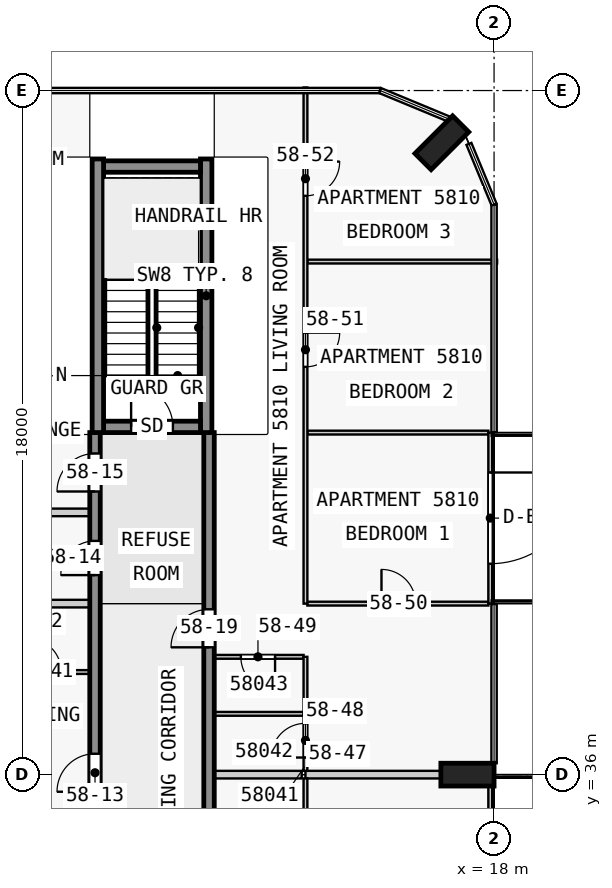
"""IFC4 building model, lengths in metres.
Left out: names, types, materials, properties, quantities, classifications, styles, units other than length and angle.
Written with IfcOpenShell. Run it as: python <this file> out.ifc"""

import sys

from ifc_helpers import new_model, si_unit, direction, frame, frame_2d, origin, origin_2d, place, context, subcontext, project, spatial, rectangle, extrude, element, fill, save


model = new_model("IFC4")
c1 = context("Model", 3, precision=1e-05, world=origin(), true_north=direction((0.0, 1.0)))
c2 = subcontext(c1, "Body", "Model", "MODEL_VIEW")
j1 = project(units=[si_unit("LENGTHUNIT", "METRE"), si_unit("PLANEANGLEUNIT", "RADIAN")], contexts=[c1])
p1 = place(None, origin())
s1 = spatial("IfcSite", under=j1, at=p1, CompositionType="ELEMENT")
p2 = place(p1, origin())
s2 = spatial("IfcBuilding", under=s1, at=p2, CompositionType="ELEMENT")
p3 = place(p2, frame((0.0, 0.0, 222.4)))
s3 = spatial("IfcBuildingStorey", under=s2, at=p3, CompositionType="ELEMENT", Elevation=222.4)
for number, where, z_axis, x_axis in (
    (1, (17.3, 36.0, 0.0), (0.0, 0.0, 1.0), (0.0, 1.0, 0.0)),
    (2, (16.626, 52.626, 0.0), (0.0, 0.0, 1.0), (-0.707, 0.707, 0.0)),
):
    element("IfcColumn", number, at=place(p3, frame(where, z_axis=z_axis, x_axis=x_axis)), inside=s3, PredefinedType="COLUMN", context=c2, shape_type="SweptSolid", body=[
        extrude(rectangle(XDim=0.6, YDim=1.4, at=origin_2d()), origin(), (0.0, 0.0, 1.0), 3.5),
    ])
p4 = place(p3, frame((7.725, 45.15, 0.0), z_axis=(0.0, 0.0, 1.0), x_axis=(1.0, 0.0, 0.0)))
e3 = element("IfcWall", 3, at=p4, inside=s3, PredefinedType="SHEAR", context=c2, shape_type="SweptSolid", body=[
    extrude(rectangle(XDim=2.55, YDim=0.3, at=frame_2d((1.275, 0.0))), origin(), (0.0, 0.0, 1.0), 3.5),
])
p5 = place(p4, frame((0.725, 0.0, 0.0)))
e4 = element("IfcOpeningElement", 4, at=p5, cuts=e3, PredefinedType="OPENING", context=c2, shape_type="SweptSolid", body=[
    extrude(rectangle(XDim=1.1, YDim=2.1, at=frame_2d((0.55, 1.05))), frame((0.0, 0.16, 0.0), z_axis=(0.0, -1.0, 0.0), x_axis=(1.0, 0.0, 0.0)), (0.0, 0.0, 1.0), 0.32),
])
p6 = place(p3, frame((7.725, 52.0, 0.0), z_axis=(0.0, 0.0, 1.0), x_axis=(1.0, 0.0, 0.0)))
e5 = element("IfcWall", 5, at=p6, inside=s3, PredefinedType="SHEAR", context=c2, shape_type="SweptSolid", body=[
    extrude(rectangle(XDim=2.55, YDim=0.3, at=frame_2d((1.275, 0.0))), origin(), (0.0, 0.0, 1.0), 3.5),
])
for number, where, z_axis, x_axis in (
    (6, (7.575, 45.0, 0.0), (0.0, 0.0, 1.0), (0.0, 1.0, 0.0)),
    (7, (10.425, 45.0, 0.0), (0.0, 0.0, 1.0), (0.0, 1.0, 0.0)),
):
    element("IfcWall", number, at=place(p3, frame(where, z_axis=z_axis, x_axis=x_axis)), inside=s3, PredefinedType="SHEAR", context=c2, shape_type="SweptSolid", body=[
        extrude(rectangle(XDim=7.2, YDim=0.3, at=frame_2d((3.6, 0.0))), origin(), (0.0, 0.0, 1.0), 3.5),
    ])
p7 = place(p3, frame((7.5, 18.0, 0.0), z_axis=(0.0, 0.0, 1.0), x_axis=(0.0, 1.0, 0.0)))
e8 = element("IfcWall", 8, at=p7, inside=s3, PredefinedType="SHEAR", context=c2, shape_type="SweptSolid", body=[
    extrude(rectangle(XDim=27.0, YDim=0.275, at=frame_2d((13.5, 0.0))), origin(), (0.0, 0.0, 1.0), 3.25),
])
p8 = place(p7, frame((1.75, 0.0, 0.0)))
e9 = element("IfcOpeningElement", 9, at=p8, cuts=e8, PredefinedType="OPENING", context=c2, shape_type="SweptSolid", body=[
    extrude(rectangle(XDim=1.0, YDim=2.1, at=frame_2d((0.5, 1.05))), frame((0.0, 0.147, 0.0), z_axis=(0.0, -1.0, 0.0), x_axis=(1.0, 0.0, 0.0)), (0.0, 0.0, 1.0), 0.295),
])
p9 = place(p7, frame((8.55, 0.0, 0.0)))
e10 = element("IfcOpeningElement", 10, at=p9, cuts=e8, PredefinedType="OPENING", context=c2, shape_type="SweptSolid", body=[
    extrude(rectangle(XDim=1.0, YDim=2.1, at=frame_2d((0.5, 1.05))), frame((0.0, 0.147, 0.0), z_axis=(0.0, -1.0, 0.0), x_axis=(1.0, 0.0, 0.0)), (0.0, 0.0, 1.0), 0.295),
])
p10 = place(p7, frame((17.55, 0.0, 0.0)))
e11 = element("IfcOpeningElement", 11, at=p10, cuts=e8, PredefinedType="OPENING", context=c2, shape_type="SweptSolid", body=[
    extrude(rectangle(XDim=1.0, YDim=2.1, at=frame_2d((0.5, 1.05))), frame((0.0, 0.147, 0.0), z_axis=(0.0, -1.0, 0.0), x_axis=(1.0, 0.0, 0.0)), (0.0, 0.0, 1.0), 0.295),
])
p11 = place(p7, frame((23.25, 0.0, 0.0)))
e12 = element("IfcOpeningElement", 12, at=p11, cuts=e8, PredefinedType="OPENING", context=c2, shape_type="SweptSolid", body=[
    extrude(rectangle(XDim=0.9, YDim=2.1, at=frame_2d((0.45, 1.05))), frame((0.0, 0.147, 0.0), z_axis=(0.0, -1.0, 0.0), x_axis=(1.0, 0.0, 0.0)), (0.0, 0.0, 1.0), 0.295),
])
p12 = place(p7, frame((25.45, 0.0, 0.0)))
e13 = element("IfcOpeningElement", 13, at=p12, cuts=e8, PredefinedType="OPENING", context=c2, shape_type="SweptSolid", body=[
    extrude(rectangle(XDim=1.0, YDim=2.1, at=frame_2d((0.5, 1.05))), frame((0.0, 0.147, 0.0), z_axis=(0.0, -1.0, 0.0), x_axis=(1.0, 0.0, 0.0)), (0.0, 0.0, 1.0), 0.295),
])
p13 = place(p3, frame((10.5, 18.0, 0.0), z_axis=(0.0, 0.0, 1.0), x_axis=(0.0, 1.0, 0.0)))
e14 = element("IfcWall", 14, at=p13, inside=s3, PredefinedType="SHEAR", context=c2, shape_type="SweptSolid", body=[
    extrude(rectangle(XDim=27.0, YDim=0.275, at=frame_2d((13.5, 0.0))), origin(), (0.0, 0.0, 1.0), 3.25),
])
p14 = place(p13, frame((4.05, 0.0, 0.0)))
e15 = element("IfcOpeningElement", 15, at=p14, cuts=e14, PredefinedType="OPENING", context=c2, shape_type="SweptSolid", body=[
    extrude(rectangle(XDim=1.0, YDim=2.1, at=frame_2d((0.5, 1.05))), frame((0.0, 0.147, 0.0), z_axis=(0.0, -1.0, 0.0), x_axis=(1.0, 0.0, 0.0)), (0.0, 0.0, 1.0), 0.295),
])
p15 = place(p13, frame((10.35, 0.0, 0.0)))
e16 = element("IfcOpeningElement", 16, at=p15, cuts=e14, PredefinedType="OPENING", context=c2, shape_type="SweptSolid", body=[
    extrude(rectangle(XDim=1.8, YDim=2.1, at=frame_2d((0.9, 1.05))), frame((0.0, 0.147, 0.0), z_axis=(0.0, -1.0, 0.0), x_axis=(1.0, 0.0, 0.0)), (0.0, 0.0, 1.0), 0.295),
])
p16 = place(p13, frame((15.25, 0.0, 0.0)))
e17 = element("IfcOpeningElement", 17, at=p16, cuts=e14, PredefinedType="OPENING", context=c2, shape_type="SweptSolid", body=[
    extrude(rectangle(XDim=1.0, YDim=2.1, at=frame_2d((0.5, 1.05))), frame((0.0, 0.147, 0.0), z_axis=(0.0, -1.0, 0.0), x_axis=(1.0, 0.0, 0.0)), (0.0, 0.0, 1.0), 0.295),
])
p17 = place(p13, frame((21.35, 0.0, 0.0)))
e18 = element("IfcOpeningElement", 18, at=p17, cuts=e14, PredefinedType="OPENING", context=c2, shape_type="SweptSolid", body=[
    extrude(rectangle(XDim=1.0, YDim=2.1, at=frame_2d((0.5, 1.05))), frame((0.0, 0.147, 0.0), z_axis=(0.0, -1.0, 0.0), x_axis=(1.0, 0.0, 0.0)), (0.0, 0.0, 1.0), 0.295),
])
p18 = place(p3, frame((17.9, 36.0, 0.0), z_axis=(0.0, 0.0, 1.0), x_axis=(0.0, -1.0, 0.0)))
e19 = element("IfcWall", 19, at=p18, inside=s3, PredefinedType="STANDARD", context=c2, shape_type="SweptSolid", body=[
    extrude(rectangle(XDim=4.5, YDim=0.1, at=frame_2d((2.25, 0.0))), origin(), (0.0, 0.0, 1.0), 3.25),
])
p19 = place(p18, frame((1.05, 0.0, 0.0)))
e20 = element("IfcOpeningElement", 20, at=p19, cuts=e19, PredefinedType="OPENING", context=c2, shape_type="SweptSolid", body=[
    extrude(rectangle(XDim=2.4, YDim=2.4, at=frame_2d((1.2, 1.2))), frame((0.0, 0.06, 0.0), z_axis=(0.0, -1.0, 0.0), x_axis=(1.0, 0.0, 0.0)), (0.0, 0.0, 1.0), 0.12),
])
p20 = place(p3, frame((17.9, 45.0, 0.0), z_axis=(0.0, 0.0, 1.0), x_axis=(0.0, -1.0, 0.0)))
e21 = element("IfcWall", 21, at=p20, inside=s3, PredefinedType="STANDARD", context=c2, shape_type="SweptSolid", body=[
    extrude(rectangle(XDim=4.5, YDim=0.1, at=frame_2d((2.25, 0.0))), origin(), (0.0, 0.0, 1.0), 3.25),
])
p21 = place(p20, frame((1.05, 0.0, 0.0)))
e22 = element("IfcOpeningElement", 22, at=p21, cuts=e21, PredefinedType="OPENING", context=c2, shape_type="SweptSolid", body=[
    extrude(rectangle(XDim=2.4, YDim=2.4, at=frame_2d((1.2, 1.2))), frame((0.0, 0.06, 0.0), z_axis=(0.0, -1.0, 0.0), x_axis=(1.0, 0.0, 0.0)), (0.0, 0.0, 1.0), 0.12),
])
p22 = place(p3, frame((12.938, 36.0, 0.0), z_axis=(0.0, 0.0, 1.0), x_axis=(-1.0, 0.0, 0.0)))
e23 = element("IfcWall", 23, at=p22, inside=s3, PredefinedType="PARTITIONING", context=c2, shape_type="SweptSolid", body=[
    extrude(rectangle(XDim=2.3, YDim=0.2, at=frame_2d((1.15, 0.0))), origin(), (0.0, 0.0, 1.0), 3.25),
])
p23 = place(p3, frame((13.038, 36.0, 0.0), z_axis=(0.0, 0.0, 1.0), x_axis=(1.0, 0.0, 0.0)))
e24 = element("IfcWall", 24, at=p23, inside=s3, PredefinedType="PARTITIONING", context=c2, shape_type="SweptSolid", body=[
    extrude(rectangle(XDim=3.562, YDim=0.2, at=frame_2d((1.781, 0.0))), origin(), (0.0, 0.0, 1.0), 3.25),
])
p24 = place(p3, frame((12.988, 37.6, 0.0), z_axis=(0.0, 0.0, 1.0), x_axis=(-1.0, 0.0, 0.0)))
e25 = element("IfcWall", 25, at=p24, inside=s3, PredefinedType="PARTITIONING", context=c2, shape_type="SweptSolid", body=[
    extrude(rectangle(XDim=2.35, YDim=0.1, at=frame_2d((1.175, 0.0))), origin(), (0.0, 0.0, 1.0), 3.25),
])
p25 = place(p3, frame((4.962, 38.7, 0.0), z_axis=(0.0, 0.0, 1.0), x_axis=(1.0, 0.0, 0.0)))
e26 = element("IfcWall", 26, at=p25, inside=s3, PredefinedType="PARTITIONING", context=c2, shape_type="SweptSolid", body=[
    extrude(rectangle(XDim=2.4, YDim=0.1, at=frame_2d((1.2, 0.0))), origin(), (0.0, 0.0, 1.0), 3.25),
])
p26 = place(p25, frame((0.75, 0.0, 0.0)))
e27 = element("IfcOpeningElement", 27, at=p26, cuts=e26, PredefinedType="OPENING", context=c2, shape_type="SweptSolid", body=[
    extrude(rectangle(XDim=0.9, YDim=2.1, at=frame_2d((0.45, 1.05))), frame((0.0, 0.06, 0.0), z_axis=(0.0, -1.0, 0.0), x_axis=(1.0, 0.0, 0.0)), (0.0, 0.0, 1.0), 0.12),
])
p27 = place(p3, frame((12.988, 39.1, 0.0), z_axis=(0.0, 0.0, 1.0), x_axis=(-1.0, 0.0, 0.0)))
e28 = element("IfcWall", 28, at=p27, inside=s3, PredefinedType="PARTITIONING", context=c2, shape_type="SweptSolid", body=[
    extrude(rectangle(XDim=2.35, YDim=0.1, at=frame_2d((1.175, 0.0))), origin(), (0.0, 0.0, 1.0), 3.25),
])
p28 = place(p27, frame((0.75, 0.0, 0.0)))
e29 = element("IfcOpeningElement", 29, at=p28, cuts=e28, PredefinedType="OPENING", context=c2, shape_type="SweptSolid", body=[
    extrude(rectangle(XDim=0.9, YDim=2.1, at=frame_2d((0.45, 1.05))), frame((0.0, 0.06, 0.0), z_axis=(0.0, -1.0, 0.0), x_axis=(1.0, 0.0, 0.0)), (0.0, 0.0, 1.0), 0.12),
])
p29 = place(p3, frame((13.087, 40.5, 0.0), z_axis=(0.0, 0.0, 1.0), x_axis=(1.0, 0.0, 0.0)))
e30 = element("IfcWall", 30, at=p29, inside=s3, PredefinedType="PARTITIONING", context=c2, shape_type="SweptSolid", body=[
    extrude(rectangle(XDim=4.763, YDim=0.1, at=frame_2d((2.381, 0.0))), origin(), (0.0, 0.0, 1.0), 3.25),
])
p30 = place(p29, frame((1.95, 0.0, 0.0)))
e31 = element("IfcOpeningElement", 31, at=p30, cuts=e30, PredefinedType="OPENING", context=c2, shape_type="SweptSolid", body=[
    extrude(rectangle(XDim=0.9, YDim=2.1, at=frame_2d((0.45, 1.05))), frame((0.0, 0.06, 0.0), z_axis=(0.0, -1.0, 0.0), x_axis=(1.0, 0.0, 0.0)), (0.0, 0.0, 1.0), 0.12),
])
p31 = place(p3, frame((7.363, 40.5, 0.0), z_axis=(0.0, 0.0, 1.0), x_axis=(-1.0, 0.0, 0.0)))
e32 = element("IfcWall", 32, at=p31, inside=s3, PredefinedType="PARTITIONING", context=c2, shape_type="SweptSolid", body=[
    extrude(rectangle(XDim=2.3, YDim=0.2, at=frame_2d((1.15, 0.0))), origin(), (0.0, 0.0, 1.0), 3.25),
])
p32 = place(p3, frame((7.363, 42.9, 0.0), z_axis=(0.0, 0.0, 1.0), x_axis=(-1.0, 0.0, 0.0)))
e33 = element("IfcWall", 33, at=p32, inside=s3, PredefinedType="PARTITIONING", context=c2, shape_type="SweptSolid", body=[
    extrude(rectangle(XDim=2.4, YDim=0.2, at=frame_2d((1.2, 0.0))), origin(), (0.0, 0.0, 1.0), 3.25),
])
p33 = place(p3, frame((17.85, 45.0, 0.0), z_axis=(0.0, 0.0, 1.0), x_axis=(-1.0, 0.0, 0.0)))
e34 = element("IfcWall", 34, at=p33, inside=s3, PredefinedType="PARTITIONING", context=c2, shape_type="SweptSolid", body=[
    extrude(rectangle(XDim=4.763, YDim=0.1, at=frame_2d((2.381, 0.0))), origin(), (0.0, 0.0, 1.0), 3.25),
])
p34 = place(p3, frame((18.08, 49.5, 0.0), z_axis=(0.0, 0.0, 1.0), x_axis=(-1.0, 0.0, 0.0)))
e35 = element("IfcWall", 35, at=p34, inside=s3, PredefinedType="PARTITIONING", context=c2, shape_type="SweptSolid", body=[
    extrude(rectangle(XDim=4.993, YDim=0.1, at=frame_2d((2.496, 0.0))), origin(), (0.0, 0.0, 1.0), 3.25),
])
p35 = place(p3, frame((13.038, 54.08, 0.0), z_axis=(0.0, 0.0, 1.0), x_axis=(0.0, -1.0, 0.0)))
e36 = element("IfcWall", 36, at=p35, inside=s3, PredefinedType="PARTITIONING", context=c2, shape_type="SweptSolid", body=[
    extrude(rectangle(XDim=13.58, YDim=0.1, at=frame_2d((6.79, 0.0))), origin(), (0.0, 0.0, 1.0), 3.25),
])
p36 = place(p35, frame((6.45, 0.0, 0.0)))
e37 = element("IfcOpeningElement", 37, at=p36, cuts=e36, PredefinedType="OPENING", context=c2, shape_type="SweptSolid", body=[
    extrude(rectangle(XDim=0.9, YDim=2.1, at=frame_2d((0.45, 1.05))), frame((0.0, 0.06, 0.0), z_axis=(0.0, -1.0, 0.0), x_axis=(1.0, 0.0, 0.0)), (0.0, 0.0, 1.0), 0.12),
])
p37 = place(p35, frame((1.95, 0.0, 0.0)))
e38 = element("IfcOpeningElement", 38, at=p37, cuts=e36, PredefinedType="OPENING", context=c2, shape_type="SweptSolid", body=[
    extrude(rectangle(XDim=0.9, YDim=2.1, at=frame_2d((0.45, 1.05))), frame((0.0, 0.06, 0.0), z_axis=(0.0, -1.0, 0.0), x_axis=(1.0, 0.0, 0.0)), (0.0, 0.0, 1.0), 0.12),
])
p38 = place(p3, frame((13.038, 34.5, 0.0), z_axis=(0.0, 0.0, 1.0), x_axis=(0.0, 1.0, 0.0)))
e39 = element("IfcWall", 39, at=p38, inside=s3, PredefinedType="PARTITIONING", context=c2, shape_type="SweptSolid", body=[
    extrude(rectangle(XDim=1.4, YDim=0.1, at=frame_2d((0.7, 0.0))), origin(), (0.0, 0.0, 1.0), 3.25),
])
p39 = place(p3, frame((13.038, 36.1, 0.0), z_axis=(0.0, 0.0, 1.0), x_axis=(0.0, 1.0, 0.0)))
e40 = element("IfcWall", 40, at=p39, inside=s3, PredefinedType="PARTITIONING", context=c2, shape_type="SweptSolid", body=[
    extrude(rectangle(XDim=3.0, YDim=0.1, at=frame_2d((1.5, 0.0))), origin(), (0.0, 0.0, 1.0), 3.25),
])
p40 = place(p39, frame((0.35, 0.0, 0.0)))
e41 = element("IfcOpeningElement", 41, at=p40, cuts=e40, PredefinedType="OPENING", context=c2, shape_type="SweptSolid", body=[
    extrude(rectangle(XDim=0.9, YDim=2.1, at=frame_2d((0.45, 1.05))), frame((0.0, 0.06, 0.0), z_axis=(0.0, -1.0, 0.0), x_axis=(1.0, 0.0, 0.0)), (0.0, 0.0, 1.0), 0.12),
])
p41 = place(p21, origin())
e42 = element("IfcDoor", 42, at=p41, inside=s3, OperationType="SINGLE_SWING_LEFT", PredefinedType="DOOR", context=c2, shape_type="SweptSolid", body=[
    extrude(rectangle(XDim=2.4, YDim=2.4, at=frame_2d((1.2, 1.2))), frame((0.0, 0.025, 0.0), z_axis=(0.0, -1.0, 0.0), x_axis=(1.0, 0.0, 0.0)), (0.0, 0.0, 1.0), 0.05),
])
fill(e22, e42)
p42 = place(p5, origin())
e43 = element("IfcDoor", 43, at=p42, inside=s3, OperationType="SINGLE_SWING_LEFT", PredefinedType="DOOR", context=c2, shape_type="SweptSolid", body=[
    extrude(rectangle(XDim=1.1, YDim=2.1, at=frame_2d((0.55, 1.05))), frame((0.0, 0.025, 0.0), z_axis=(0.0, -1.0, 0.0), x_axis=(1.0, 0.0, 0.0)), (0.0, 0.0, 1.0), 0.05),
])
fill(e4, e43)
p43 = place(p10, origin())
e44 = element("IfcDoor", 44, at=p43, inside=s3, OperationType="SINGLE_SWING_RIGHT", PredefinedType="DOOR", context=c2, shape_type="SweptSolid", body=[
    extrude(rectangle(XDim=1.0, YDim=2.1, at=frame_2d((0.5, 1.05))), frame((0.0, 0.025, 0.0), z_axis=(0.0, -1.0, 0.0), x_axis=(1.0, 0.0, 0.0)), (0.0, 0.0, 1.0), 0.05),
])
fill(e11, e44)
p44 = place(p11, origin())
e45 = element("IfcDoor", 45, at=p44, inside=s3, OperationType="SINGLE_SWING_RIGHT", PredefinedType="DOOR", context=c2, shape_type="SweptSolid", body=[
    extrude(rectangle(XDim=0.9, YDim=2.1, at=frame_2d((0.45, 1.05))), frame((0.0, 0.025, 0.0), z_axis=(0.0, -1.0, 0.0), x_axis=(1.0, 0.0, 0.0)), (0.0, 0.0, 1.0), 0.05),
])
fill(e12, e45)
p45 = place(p12, origin())
e46 = element("IfcDoor", 46, at=p45, inside=s3, OperationType="SINGLE_SWING_RIGHT", PredefinedType="DOOR", context=c2, shape_type="SweptSolid", body=[
    extrude(rectangle(XDim=1.0, YDim=2.1, at=frame_2d((0.5, 1.05))), frame((0.0, 0.025, 0.0), z_axis=(0.0, -1.0, 0.0), x_axis=(1.0, 0.0, 0.0)), (0.0, 0.0, 1.0), 0.05),
])
fill(e13, e46)
p46 = place(p17, origin())
e47 = element("IfcDoor", 47, at=p46, inside=s3, OperationType="SINGLE_SWING_RIGHT", PredefinedType="DOOR", context=c2, shape_type="SweptSolid", body=[
    extrude(rectangle(XDim=1.0, YDim=2.1, at=frame_2d((0.5, 1.05))), frame((0.0, 0.025, 0.0), z_axis=(0.0, -1.0, 0.0), x_axis=(1.0, 0.0, 0.0)), (0.0, 0.0, 1.0), 0.05),
])
fill(e18, e47)
p47 = place(p26, origin())
e48 = element("IfcDoor", 48, at=p47, inside=s3, OperationType="SINGLE_SWING_RIGHT", PredefinedType="DOOR", context=c2, shape_type="SweptSolid", body=[
    extrude(rectangle(XDim=0.9, YDim=2.1, at=frame_2d((0.45, 1.05))), frame((0.0, 0.025, 0.0), z_axis=(0.0, -1.0, 0.0), x_axis=(1.0, 0.0, 0.0)), (0.0, 0.0, 1.0), 0.05),
])
fill(e27, e48)
p48 = place(p40, origin())
e49 = element("IfcDoor", 49, at=p48, inside=s3, OperationType="SINGLE_SWING_LEFT", PredefinedType="DOOR", context=c2, shape_type="SweptSolid", body=[
    extrude(rectangle(XDim=0.9, YDim=2.1, at=frame_2d((0.45, 1.05))), frame((0.0, 0.025, 0.0), z_axis=(0.0, -1.0, 0.0), x_axis=(1.0, 0.0, 0.0)), (0.0, 0.0, 1.0), 0.05),
])
fill(e41, e49)
p49 = place(p28, origin())
e50 = element("IfcDoor", 50, at=p49, inside=s3, OperationType="SINGLE_SWING_RIGHT", PredefinedType="DOOR", context=c2, shape_type="SweptSolid", body=[
    extrude(rectangle(XDim=0.9, YDim=2.1, at=frame_2d((0.45, 1.05))), frame((0.0, 0.025, 0.0), z_axis=(0.0, -1.0, 0.0), x_axis=(1.0, 0.0, 0.0)), (0.0, 0.0, 1.0), 0.05),
])
fill(e29, e50)
p50 = place(p30, origin())
e51 = element("IfcDoor", 51, at=p50, inside=s3, OperationType="SINGLE_SWING_RIGHT", PredefinedType="DOOR", context=c2, shape_type="SweptSolid", body=[
    extrude(rectangle(XDim=0.9, YDim=2.1, at=frame_2d((0.45, 1.05))), frame((0.0, 0.025, 0.0), z_axis=(0.0, -1.0, 0.0), x_axis=(1.0, 0.0, 0.0)), (0.0, 0.0, 1.0), 0.05),
])
fill(e31, e51)
p51 = place(p36, origin())
e52 = element("IfcDoor", 52, at=p51, inside=s3, OperationType="SINGLE_SWING_RIGHT", PredefinedType="DOOR", context=c2, shape_type="SweptSolid", body=[
    extrude(rectangle(XDim=0.9, YDim=2.1, at=frame_2d((0.45, 1.05))), frame((0.0, 0.025, 0.0), z_axis=(0.0, -1.0, 0.0), x_axis=(1.0, 0.0, 0.0)), (0.0, 0.0, 1.0), 0.05),
])
fill(e37, e52)
p52 = place(p37, origin())
e53 = element("IfcDoor", 53, at=p52, inside=s3, OperationType="SINGLE_SWING_LEFT", PredefinedType="DOOR", context=c2, shape_type="SweptSolid", body=[
    extrude(rectangle(XDim=0.9, YDim=2.1, at=frame_2d((0.45, 1.05))), frame((0.0, 0.025, 0.0), z_axis=(0.0, -1.0, 0.0), x_axis=(1.0, 0.0, 0.0)), (0.0, 0.0, 1.0), 0.05),
])
fill(e38, e53)
save(model, sys.argv[1])
